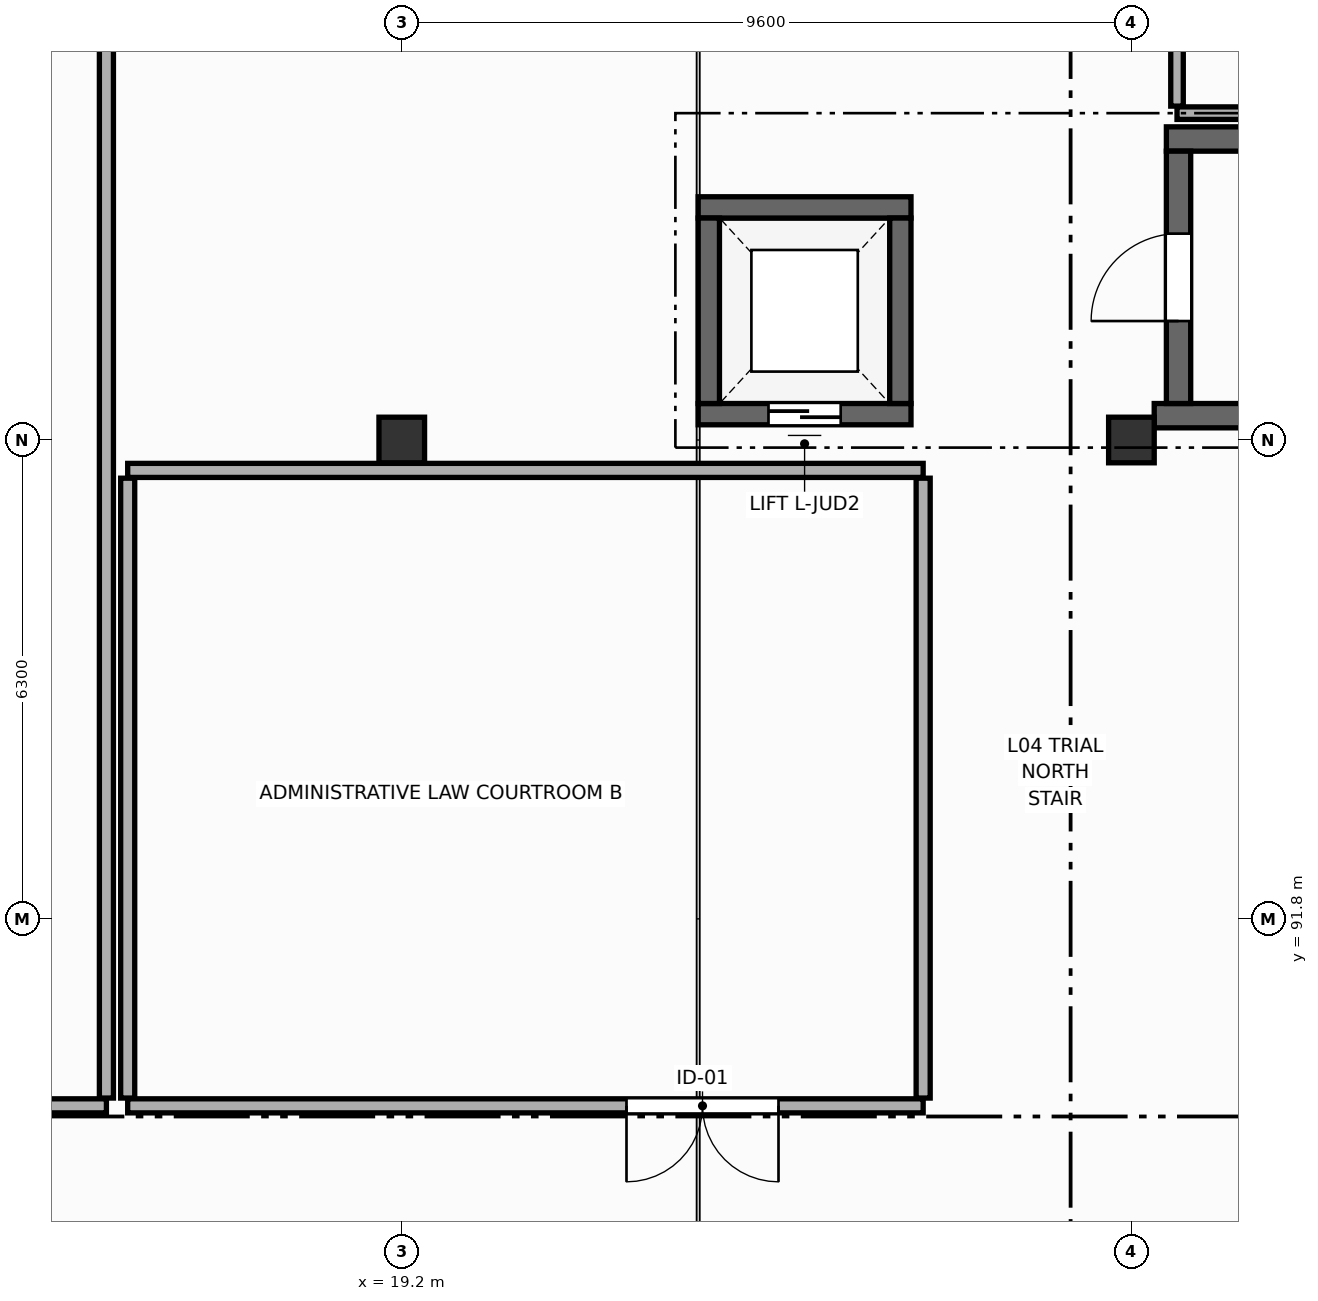
"""IFC4 building model, lengths in metres.
Left out: names, types, materials, properties, quantities, classifications, styles, units other than length and angle.
Written with IfcOpenShell. Run it as: python <this file> out.ifc"""

import sys

from ifc_helpers import new_model, si_unit, direction, frame, frame_2d, origin, origin_2d, place, context, subcontext, project, spatial, rectangle, extrude, element, fill, save


model = new_model("IFC4")
c1 = context("Model", 3, precision=1e-05, world=origin(), true_north=direction((0.0, 1.0)))
c2 = subcontext(c1, "Body", "Model", "MODEL_VIEW")
j1 = project(units=[si_unit("LENGTHUNIT", "METRE"), si_unit("PLANEANGLEUNIT", "RADIAN")], contexts=[c1])
p1 = place(None, origin())
s1 = spatial("IfcSite", under=j1, at=p1, CompositionType="ELEMENT")
p2 = place(p1, origin())
s2 = spatial("IfcBuilding", under=s1, at=p2, CompositionType="ELEMENT")
p3 = place(p2, frame((0.0, 0.0, 14.4)))
s3 = spatial("IfcBuildingStorey", under=s2, at=p3, CompositionType="ELEMENT", Elevation=14.4)
for number, where, z_axis, x_axis in (
    (1, (19.2, 98.1, 0.0), (0.0, 0.0, 1.0), (1.0, 0.0, 0.0)),
    (2, (28.8, 98.1, 0.0), (0.0, 0.0, 1.0), (1.0, 0.0, 0.0)),
):
    element("IfcColumn", number, at=place(p3, frame(where, z_axis=z_axis, x_axis=x_axis)), inside=s3, PredefinedType="COLUMN", context=c2, shape_type="SweptSolid", body=[
        extrude(rectangle(XDim=0.6, YDim=0.6, at=origin_2d()), origin(), (0.0, 0.0, 1.0), 4.2),
    ])
p4 = place(p3, frame((29.26, 102.06, 0.0), z_axis=(0.0, 0.0, 1.0), x_axis=(1.0, 0.0, 0.0)))
e3 = element("IfcWall", 3, at=p4, inside=s3, PredefinedType="SHEAR", context=c2, shape_type="SweptSolid", body=[
    extrude(rectangle(XDim=9.18, YDim=0.32, at=frame_2d((4.59, 0.0))), origin(), (0.0, 0.0, 1.0), 3.96),
])
p5 = place(p3, frame((38.44, 98.42, 0.0), z_axis=(0.0, 0.0, 1.0), x_axis=(-1.0, 0.0, 0.0)))
e4 = element("IfcWall", 4, at=p5, inside=s3, PredefinedType="SHEAR", context=c2, shape_type="SweptSolid", body=[
    extrude(rectangle(XDim=9.34, YDim=0.32, at=frame_2d((4.67, 0.0))), origin(), (0.0, 0.0, 1.0), 3.96),
])
p6 = place(p3, frame((29.42, 98.58, 0.0), z_axis=(0.0, 0.0, 1.0), x_axis=(0.0, 1.0, 0.0)))
e5 = element("IfcWall", 5, at=p6, inside=s3, PredefinedType="SHEAR", context=c2, shape_type="SweptSolid", body=[
    extrude(rectangle(XDim=3.32, YDim=0.32, at=frame_2d((1.66, 0.0))), origin(), (0.0, 0.0, 1.0), 3.96),
])
p7 = place(p6, frame((1.085, 0.0, 0.0)))
e6 = element("IfcOpeningElement", 6, at=p7, cuts=e5, PredefinedType="OPENING", context=c2, shape_type="SweptSolid", body=[
    extrude(rectangle(XDim=1.15, YDim=2.2, at=frame_2d((0.575, 1.1))), frame((0.0, 0.17, 0.0), z_axis=(0.0, -1.0, 0.0), x_axis=(1.0, 0.0, 0.0)), (0.0, 0.0, 1.0), 0.34),
])
p8 = place(p3, frame((23.1, 101.16, 0.0), z_axis=(0.0, 0.0, 1.0), x_axis=(1.0, 0.0, 0.0)))
e7 = element("IfcWall", 7, at=p8, inside=s3, PredefinedType="SHEAR", context=c2, shape_type="SweptSolid", body=[
    extrude(rectangle(XDim=2.8, YDim=0.28, at=frame_2d((1.4, 0.0))), origin(), (0.0, 0.0, 1.0), 3.96),
])
p9 = place(p3, frame((25.9, 98.44, 0.0), z_axis=(0.0, 0.0, 1.0), x_axis=(-1.0, 0.0, 0.0)))
e8 = element("IfcWall", 8, at=p9, inside=s3, PredefinedType="SHEAR", context=c2, shape_type="SweptSolid", body=[
    extrude(rectangle(XDim=2.8, YDim=0.28, at=frame_2d((1.4, 0.0))), origin(), (0.0, 0.0, 1.0), 3.96),
])
p10 = place(p9, frame((0.925, 0.0, 0.0)))
e9 = element("IfcOpeningElement", 9, at=p10, cuts=e8, PredefinedType="OPENING", context=c2, shape_type="SweptSolid", body=[
    extrude(rectangle(XDim=0.95, YDim=2.15, at=frame_2d((0.475, 1.075))), frame((0.0, 0.15, 0.0), z_axis=(0.0, -1.0, 0.0), x_axis=(1.0, 0.0, 0.0)), (0.0, 0.0, 1.0), 0.3),
])
for number, where, z_axis, x_axis in (
    (10, (23.24, 98.58, 0.0), (0.0, 0.0, 1.0), (0.0, 1.0, 0.0)),
    (11, (25.76, 101.02, 0.0), (0.0, 0.0, 1.0), (0.0, -1.0, 0.0)),
):
    element("IfcWall", number, at=place(p3, frame(where, z_axis=z_axis, x_axis=x_axis)), inside=s3, PredefinedType="SHEAR", context=c2, shape_type="SweptSolid", body=[
        extrude(rectangle(XDim=2.44, YDim=0.28, at=frame_2d((1.22, 0.0))), origin(), (0.0, 0.0, 1.0), 3.96),
    ])
p11 = place(p3, frame((15.314, 89.34, 0.0), z_axis=(0.0, 0.0, 1.0), x_axis=(-1.0, 0.0, 0.0)))
e12 = element("IfcWall", 12, at=p11, inside=s3, PredefinedType="PARTITIONING", context=c2, shape_type="SweptSolid", body=[
    extrude(rectangle(XDim=14.86, YDim=0.185, at=frame_2d((7.43, 0.0))), origin(), (0.0, 0.0, 1.0), 3.09),
])
p12 = place(p11, frame((2.174, 0.0, 0.0)))
e13 = element("IfcOpeningElement", 13, at=p12, cuts=e12, PredefinedType="OPENING", context=c2, shape_type="SweptSolid", body=[
    extrude(rectangle(XDim=2.0, YDim=2.5, at=frame_2d((1.0, 1.25))), frame((0.0, 0.103, 0.0), z_axis=(0.0, -1.0, 0.0), x_axis=(1.0, 0.0, 0.0)), (0.0, 0.0, 1.0), 0.205),
])
p13 = place(p3, frame((15.314, 112.346, 0.0), z_axis=(0.0, 0.0, 1.0), x_axis=(0.0, -1.0, 0.0)))
e14 = element("IfcWall", 14, at=p13, inside=s3, PredefinedType="PARTITIONING", context=c2, shape_type="SweptSolid", body=[
    extrude(rectangle(XDim=22.904, YDim=0.185, at=frame_2d((11.452, 0.0))), origin(), (0.0, 0.0, 1.0), 3.29),
])
p14 = place(p3, frame((15.594, 97.7, 0.0), z_axis=(0.0, 0.0, 1.0), x_axis=(1.0, 0.0, 0.0)))
e15 = element("IfcWall", 15, at=p14, inside=s3, PredefinedType="PARTITIONING", context=c2, shape_type="SweptSolid", body=[
    extrude(rectangle(XDim=10.466, YDim=0.185, at=frame_2d((5.233, 0.0))), origin(), (0.0, 0.0, 1.0), 3.04),
])
p15 = place(p3, frame((26.06, 89.34, 0.0), z_axis=(0.0, 0.0, 1.0), x_axis=(-1.0, 0.0, 0.0)))
e16 = element("IfcWall", 16, at=p15, inside=s3, PredefinedType="PARTITIONING", context=c2, shape_type="SweptSolid", body=[
    extrude(rectangle(XDim=10.466, YDim=0.185, at=frame_2d((5.233, 0.0))), origin(), (0.0, 0.0, 1.0), 3.09),
])
p16 = place(p15, frame((1.903, 0.0, 0.0)))
e17 = element("IfcOpeningElement", 17, at=p16, cuts=e16, PredefinedType="OPENING", context=c2, shape_type="SweptSolid", body=[
    extrude(rectangle(XDim=2.0, YDim=2.5, at=frame_2d((1.0, 1.25))), frame((0.0, 0.103, 0.0), z_axis=(0.0, -1.0, 0.0), x_axis=(1.0, 0.0, 0.0)), (0.0, 0.0, 1.0), 0.205),
])
for number, where, z_axis, x_axis in (
    (18, (15.594, 89.442, 0.0), (0.0, 0.0, 1.0), (0.0, 1.0, 0.0)),
    (19, (26.06, 97.597, 0.0), (0.0, 0.0, 1.0), (0.0, -1.0, 0.0)),
):
    element("IfcWall", number, at=place(p3, frame(where, z_axis=z_axis, x_axis=x_axis)), inside=s3, PredefinedType="PARTITIONING", context=c2, shape_type="SweptSolid", body=[
        extrude(rectangle(XDim=8.155, YDim=0.185, at=frame_2d((4.078, 0.0))), origin(), (0.0, 0.0, 1.0), 3.34),
    ])
p17 = place(p3, frame((45.6, 102.4, 0.0), z_axis=(0.0, 0.0, 1.0), x_axis=(-1.0, 0.0, 0.0)))
e20 = element("IfcWall", 20, at=p17, inside=s3, PredefinedType="PARTITIONING", context=c2, shape_type="SweptSolid", body=[
    extrude(rectangle(XDim=16.2, YDim=0.165, at=frame_2d((8.1, 0.0))), origin(), (0.0, 0.0, 1.0), 3.04),
])
p18 = place(p3, frame((29.4, 102.492, 0.0), z_axis=(0.0, 0.0, 1.0), x_axis=(0.0, 1.0, 0.0)))
e21 = element("IfcWall", 21, at=p18, inside=s3, PredefinedType="PARTITIONING", context=c2, shape_type="SweptSolid", body=[
    extrude(rectangle(XDim=9.854, YDim=0.165, at=frame_2d((4.927, 0.0))), origin(), (0.0, 0.0, 1.0), 3.34),
])
p19 = place(p18, frame((1.981, 0.0, 0.0)))
e22 = element("IfcOpeningElement", 22, at=p19, cuts=e21, PredefinedType="OPENING", context=c2, shape_type="SweptSolid", body=[
    extrude(rectangle(XDim=1.0, YDim=2.15, at=frame_2d((0.5, 1.075))), frame((0.0, 0.093, 0.0), z_axis=(0.0, -1.0, 0.0), x_axis=(1.0, 0.0, 0.0)), (0.0, 0.0, 1.0), 0.185),
])
p20 = place(p7, origin())
e23 = element("IfcDoor", 23, at=p20, inside=s3, OperationType="SINGLE_SWING_LEFT", PredefinedType="DOOR", context=c2, shape_type="SweptSolid", body=[
    extrude(rectangle(XDim=1.15, YDim=2.2, at=frame_2d((0.575, 1.1))), frame((0.0, 0.025, 0.0), z_axis=(0.0, -1.0, 0.0), x_axis=(1.0, 0.0, 0.0)), (0.0, 0.0, 1.0), 0.05),
])
fill(e6, e23)
p21 = place(p10, origin())
e24 = element("IfcDoor", 24, at=p21, inside=s3, OperationType="DOUBLE_DOOR_SLIDING", PredefinedType="DOOR", context=c2, shape_type="SweptSolid", body=[
    extrude(rectangle(XDim=0.95, YDim=2.15, at=frame_2d((0.475, 1.075))), frame((0.0, 0.025, 0.0), z_axis=(0.0, -1.0, 0.0), x_axis=(1.0, 0.0, 0.0)), (0.0, 0.0, 1.0), 0.05),
])
fill(e9, e24)
p22 = place(p16, origin())
e25 = element("IfcDoor", 25, at=p22, inside=s3, OperationType="DOUBLE_DOOR_SINGLE_SWING", PredefinedType="DOOR", context=c2, shape_type="SweptSolid", body=[
    extrude(rectangle(XDim=2.0, YDim=2.5, at=frame_2d((1.0, 1.25))), frame((0.0, 0.025, 0.0), z_axis=(0.0, -1.0, 0.0), x_axis=(1.0, 0.0, 0.0)), (0.0, 0.0, 1.0), 0.05),
])
fill(e17, e25)
save(model, sys.argv[1])
